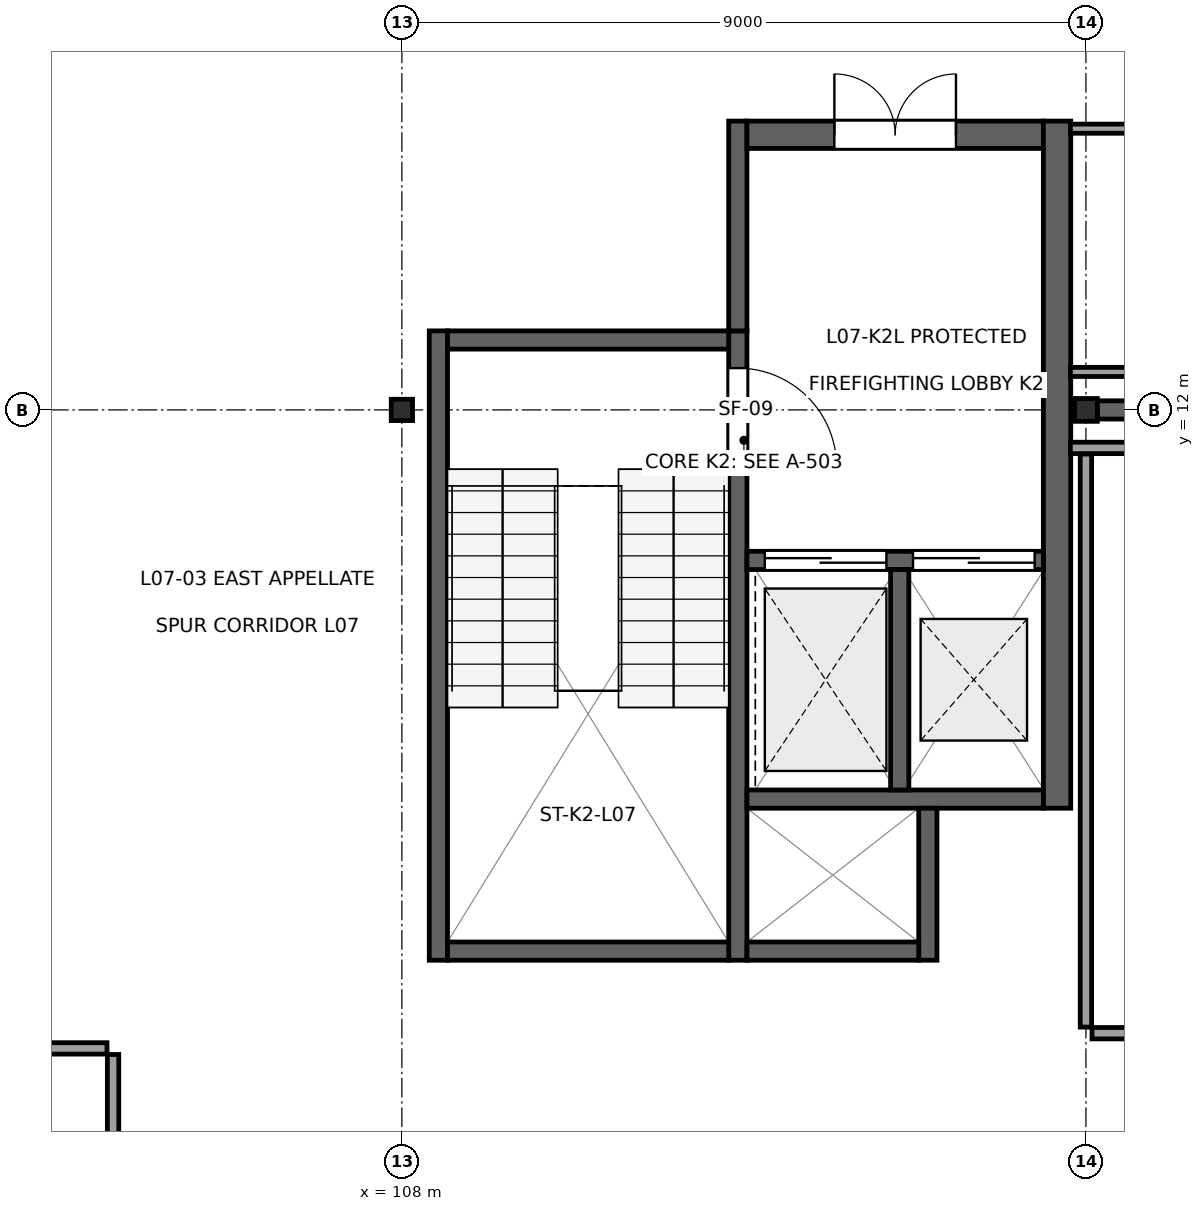
"""IFC4 building model, lengths in metres.
Left out: names, types, materials, properties, quantities, classifications, styles, units other than length and angle.
Written with IfcOpenShell. Run it as: python <this file> out.ifc"""

import sys

from ifc_helpers import new_model, si_unit, direction, frame, frame_2d, origin, origin_2d, place, context, subcontext, project, spatial, rectangle, i_section, extrude, element, fill, save


model = new_model("IFC4")
c1 = context("Model", 3, precision=1e-05, world=origin(), true_north=direction((0.0, 1.0)))
c2 = subcontext(c1, "Body", "Model", "MODEL_VIEW")
j1 = project(units=[si_unit("LENGTHUNIT", "METRE"), si_unit("PLANEANGLEUNIT", "RADIAN")], contexts=[c1])
p1 = place(None, origin())
s1 = spatial("IfcSite", under=j1, at=p1, CompositionType="ELEMENT")
p2 = place(p1, origin())
s2 = spatial("IfcBuilding", under=s1, at=p2, CompositionType="ELEMENT")
p3 = place(p2, frame((0.0, 0.0, 31.4)))
s3 = spatial("IfcBuildingStorey", under=s2, at=p3, CompositionType="ELEMENT", Elevation=31.4)
p4 = place(p3, frame((108.0, 12.0, 0.0), z_axis=(0.0, 0.0, 1.0), x_axis=(1.0, 0.0, 0.0)))
e1 = element("IfcColumn", 1, at=p4, inside=s3, PredefinedType="COLUMN", context=c2, shape_type="SweptSolid", body=[
    extrude(i_section(OverallWidth=0.28, OverallDepth=0.28, WebThickness=0.01, FlangeThickness=0.018, at=origin_2d()), origin(), (0.0, 0.0, 1.0), 4.0),
])
p5 = place(p3, frame((117.0, 12.0, 0.0), z_axis=(0.0, 0.0, 1.0), x_axis=(0.0, 1.0, 0.0)))
e2 = element("IfcColumn", 2, at=p5, inside=s3, PredefinedType="COLUMN", context=c2, shape_type="SweptSolid", body=[
    extrude(i_section(OverallWidth=0.3, OverallDepth=0.3, WebThickness=0.011, FlangeThickness=0.019, at=origin_2d()), origin(), (0.0, 0.0, 1.0), 4.0),
])
p6 = place(p3, frame((108.48, 4.76, 0.0), z_axis=(0.0, 0.0, 1.0), x_axis=(0.0, 1.0, 0.0)))
e3 = element("IfcWall", 3, at=p6, inside=s3, PredefinedType="SHEAR", context=c2, shape_type="SweptSolid", body=[
    extrude(rectangle(XDim=8.28, YDim=0.24, at=frame_2d((4.14, 0.0))), origin(), (0.0, 0.0, 1.0), 3.81),
])
p7 = place(p3, frame((112.42, 4.76, 0.0), z_axis=(0.0, 0.0, 1.0), x_axis=(0.0, 1.0, 0.0)))
e4 = element("IfcWall", 4, at=p7, inside=s3, PredefinedType="SHEAR", context=c2, shape_type="SweptSolid", body=[
    extrude(rectangle(XDim=8.28, YDim=0.24, at=frame_2d((4.14, 0.0))), origin(), (0.0, 0.0, 1.0), 3.81),
])
p8 = place(p7, frame((6.49, 0.0, 0.0)))
e5 = element("IfcOpeningElement", 5, at=p8, cuts=e4, PredefinedType="OPENING", context=c2, shape_type="SweptSolid", body=[
    extrude(rectangle(XDim=1.3, YDim=2.2, at=frame_2d((0.65, 1.1))), frame((0.0, 0.135, 0.0), z_axis=(0.0, -1.0, 0.0), x_axis=(1.0, 0.0, 0.0)), (0.0, 0.0, 1.0), 0.27),
])
for number, where, z_axis, x_axis in (
    (6, (108.6, 4.88, 0.0), (0.0, 0.0, 1.0), (1.0, 0.0, 0.0)),
    (7, (108.6, 12.92, 0.0), (0.0, 0.0, 1.0), (1.0, 0.0, 0.0)),
):
    element("IfcWall", number, at=place(p3, frame(where, z_axis=z_axis, x_axis=x_axis)), inside=s3, PredefinedType="SHEAR", context=c2, shape_type="SweptSolid", body=[
        extrude(rectangle(XDim=3.7, YDim=0.24, at=frame_2d((1.85, 0.0))), origin(), (0.0, 0.0, 1.0), 3.81),
    ])
p9 = place(p3, frame((112.42, 13.04, 0.0), z_axis=(0.0, 0.0, 1.0), x_axis=(0.0, 1.0, 0.0)))
e8 = element("IfcWall", 8, at=p9, inside=s3, PredefinedType="SHEAR", context=c2, shape_type="SweptSolid", body=[
    extrude(rectangle(XDim=2.76, YDim=0.24, at=frame_2d((1.38, 0.0))), origin(), (0.0, 0.0, 1.0), 3.66),
])
p10 = place(p3, frame((112.54, 15.62, 0.0), z_axis=(0.0, 0.0, 1.0), x_axis=(1.0, 0.0, 0.0)))
e9 = element("IfcWall", 9, at=p10, inside=s3, PredefinedType="SHEAR", context=c2, shape_type="SweptSolid", body=[
    extrude(rectangle(XDim=3.9, YDim=0.36, at=frame_2d((1.95, 0.0))), origin(), (0.0, 0.0, 1.0), 3.66),
])
p11 = place(p10, frame((1.15, 0.0, 0.0)))
e10 = element("IfcOpeningElement", 10, at=p11, cuts=e9, PredefinedType="OPENING", context=c2, shape_type="SweptSolid", body=[
    extrude(rectangle(XDim=1.6, YDim=2.25, at=frame_2d((0.8, 1.125))), frame((0.0, 0.195, 0.0), z_axis=(0.0, -1.0, 0.0), x_axis=(1.0, 0.0, 0.0)), (0.0, 0.0, 1.0), 0.39),
])
p12 = place(p3, frame((116.62, 6.76, 0.0), z_axis=(0.0, 0.0, 1.0), x_axis=(0.0, 1.0, 0.0)))
e11 = element("IfcWall", 11, at=p12, inside=s3, PredefinedType="SHEAR", context=c2, shape_type="SweptSolid", body=[
    extrude(rectangle(XDim=9.04, YDim=0.36, at=frame_2d((4.52, 0.0))), origin(), (0.0, 0.0, 1.0), 3.66),
])
p13 = place(p3, frame((112.54, 10.02, 0.0), z_axis=(0.0, 0.0, 1.0), x_axis=(1.0, 0.0, 0.0)))
e12 = element("IfcWall", 12, at=p13, inside=s3, PredefinedType="SHEAR", context=c2, shape_type="SweptSolid", body=[
    extrude(rectangle(XDim=3.9, YDim=0.24, at=frame_2d((1.95, 0.0))), origin(), (0.0, 0.0, 1.0), 3.81),
])
p14 = place(p13, frame((0.235, 0.0, 0.0)))
e13 = element("IfcOpeningElement", 13, at=p14, cuts=e12, PredefinedType="OPENING", context=c2, shape_type="SweptSolid", body=[
    extrude(rectangle(XDim=1.6, YDim=2.3, at=frame_2d((0.8, 1.15))), frame((0.0, 0.135, 0.0), z_axis=(0.0, -1.0, 0.0), x_axis=(1.0, 0.0, 0.0)), (0.0, 0.0, 1.0), 0.27),
])
p15 = place(p13, frame((2.185, 0.0, 0.0)))
e14 = element("IfcOpeningElement", 14, at=p15, cuts=e12, PredefinedType="OPENING", context=c2, shape_type="SweptSolid", body=[
    extrude(rectangle(XDim=1.6, YDim=2.3, at=frame_2d((0.8, 1.15))), frame((0.0, 0.135, 0.0), z_axis=(0.0, -1.0, 0.0), x_axis=(1.0, 0.0, 0.0)), (0.0, 0.0, 1.0), 0.27),
])
p16 = place(p3, frame((112.54, 6.88, 0.0), z_axis=(0.0, 0.0, 1.0), x_axis=(1.0, 0.0, 0.0)))
e15 = element("IfcWall", 15, at=p16, inside=s3, PredefinedType="SHEAR", context=c2, shape_type="SweptSolid", body=[
    extrude(rectangle(XDim=3.9, YDim=0.24, at=frame_2d((1.95, 0.0))), origin(), (0.0, 0.0, 1.0), 3.81),
])
p17 = place(p3, frame((114.55, 7.0, 0.0), z_axis=(0.0, 0.0, 1.0), x_axis=(0.0, 1.0, 0.0)))
e16 = element("IfcWall", 16, at=p17, inside=s3, PredefinedType="SHEAR", context=c2, shape_type="SweptSolid", body=[
    extrude(rectangle(XDim=2.9, YDim=0.24, at=frame_2d((1.45, 0.0))), origin(), (0.0, 0.0, 1.0), 3.81),
])
p18 = place(p3, frame((114.92, 4.76, 0.0), z_axis=(0.0, 0.0, 1.0), x_axis=(0.0, 1.0, 0.0)))
e17 = element("IfcWall", 17, at=p18, inside=s3, PredefinedType="SHEAR", context=c2, shape_type="SweptSolid", body=[
    extrude(rectangle(XDim=2.0, YDim=0.24, at=frame_2d((1.0, 0.0))), origin(), (0.0, 0.0, 1.0), 3.81),
])
p19 = place(p3, frame((112.54, 4.88, 0.0), z_axis=(0.0, 0.0, 1.0), x_axis=(1.0, 0.0, 0.0)))
e18 = element("IfcWall", 18, at=p19, inside=s3, PredefinedType="SHEAR", context=c2, shape_type="SweptSolid", body=[
    extrude(rectangle(XDim=2.26, YDim=0.24, at=frame_2d((1.13, 0.0))), origin(), (0.0, 0.0, 1.0), 3.81),
])
p20 = place(p3, frame((117.148, 12.0, 0.0), z_axis=(0.0, 0.0, 1.0), x_axis=(1.0, 0.0, 0.0)))
e19 = element("IfcWall", 19, at=p20, inside=s3, PredefinedType="SHEAR", context=c2, shape_type="SweptSolid", body=[
    extrude(rectangle(XDim=8.844, YDim=0.24, at=frame_2d((4.422, 0.0))), origin(), (0.0, 0.0, 1.0), 3.305),
])
p21 = place(p3, frame((45.88, 3.6, 0.0), z_axis=(0.0, 0.0, 1.0), x_axis=(1.0, 0.0, 0.0)))
e20 = element("IfcWall", 20, at=p21, inside=s3, PredefinedType="PARTITIONING", context=c2, shape_type="SweptSolid", body=[
    extrude(rectangle(XDim=58.24, YDim=0.15, at=frame_2d((29.12, 0.0))), origin(), (0.0, 0.0, 1.0), 3.64),
])
p22 = place(p21, frame((27.795, 0.0, 0.0)))
e21 = element("IfcOpeningElement", 21, at=p22, cuts=e20, PredefinedType="OPENING", context=c2, shape_type="SweptSolid", body=[
    extrude(rectangle(XDim=1.05, YDim=2.25, at=frame_2d((0.525, 1.125))), frame((0.0, 0.09, 0.0), z_axis=(0.0, -1.0, 0.0), x_axis=(1.0, 0.0, 0.0)), (0.0, 0.0, 1.0), 0.18),
])
p23 = place(p3, frame((104.2, 3.52, 0.0), z_axis=(0.0, 0.0, 1.0), x_axis=(0.0, -1.0, 0.0)))
e22 = element("IfcWall", 22, at=p23, inside=s3, PredefinedType="PARTITIONING", context=c2, shape_type="SweptSolid", body=[
    extrude(rectangle(XDim=3.385, YDim=0.15, at=frame_2d((1.692, 0.0))), origin(), (0.0, 0.0, 1.0), 3.64),
])
p24 = place(p3, frame((117.0, 3.88, 0.0), z_axis=(0.0, 0.0, 1.0), x_axis=(0.0, 1.0, 0.0)))
e23 = element("IfcWall", 23, at=p24, inside=s3, PredefinedType="PARTITIONING", context=c2, shape_type="SweptSolid", body=[
    extrude(rectangle(XDim=7.54, YDim=0.15, at=frame_2d((3.77, 0.0))), origin(), (0.0, 0.0, 1.0), 3.305),
])
p25 = place(p3, frame((116.795, 11.5, 0.0), z_axis=(0.0, 0.0, 1.0), x_axis=(1.0, 0.0, 0.0)))
e24 = element("IfcWall", 24, at=p25, inside=s3, PredefinedType="PARTITIONING", context=c2, shape_type="SweptSolid", body=[
    extrude(rectangle(XDim=9.07, YDim=0.15, at=frame_2d((4.535, 0.0))), origin(), (0.0, 0.0, 1.0), 3.64),
])
p26 = place(p3, frame((125.865, 3.8, 0.0), z_axis=(0.0, 0.0, 1.0), x_axis=(-1.0, 0.0, 0.0)))
e25 = element("IfcWall", 25, at=p26, inside=s3, PredefinedType="PARTITIONING", context=c2, shape_type="SweptSolid", body=[
    extrude(rectangle(XDim=8.785, YDim=0.15, at=frame_2d((4.393, 0.0))), origin(), (0.0, 0.0, 1.0), 3.64),
])
p27 = place(p26, frame((3.867, 0.0, 0.0)))
e26 = element("IfcOpeningElement", 26, at=p27, cuts=e25, PredefinedType="OPENING", context=c2, shape_type="SweptSolid", body=[
    extrude(rectangle(XDim=1.05, YDim=2.25, at=frame_2d((0.525, 1.125))), frame((0.0, 0.09, 0.0), z_axis=(0.0, -1.0, 0.0), x_axis=(1.0, 0.0, 0.0)), (0.0, 0.0, 1.0), 0.18),
])
p28 = place(p3, frame((125.865, 12.5, 0.0), z_axis=(0.0, 0.0, 1.0), x_axis=(-1.0, 0.0, 0.0)))
e27 = element("IfcWall", 27, at=p28, inside=s3, PredefinedType="PARTITIONING", context=c2, shape_type="SweptSolid", body=[
    extrude(rectangle(XDim=9.07, YDim=0.12, at=frame_2d((4.535, 0.0))), origin(), (0.0, 0.0, 1.0), 3.64),
])
p29 = place(p3, frame((116.795, 15.7, 0.0), z_axis=(0.0, 0.0, 1.0), x_axis=(1.0, 0.0, 0.0)))
e28 = element("IfcWall", 28, at=p29, inside=s3, PredefinedType="PARTITIONING", context=c2, shape_type="SweptSolid", body=[
    extrude(rectangle(XDim=9.07, YDim=0.12, at=frame_2d((4.535, 0.0))), origin(), (0.0, 0.0, 1.0), 3.64),
])
p30 = place(p29, frame((4.06, 0.0, 0.0)))
e29 = element("IfcOpeningElement", 29, at=p30, cuts=e28, PredefinedType="OPENING", context=c2, shape_type="SweptSolid", body=[
    extrude(rectangle(XDim=0.95, YDim=2.15, at=frame_2d((0.475, 1.075))), frame((0.0, 0.075, 0.0), z_axis=(0.0, -1.0, 0.0), x_axis=(1.0, 0.0, 0.0)), (0.0, 0.0, 1.0), 0.15),
])
p31 = place(p8, frame((1.3, 0.0, 0.0), z_axis=(0.0, 0.0, 1.0), x_axis=(-1.0, 0.0, 0.0)))
e30 = element("IfcDoor", 30, at=p31, inside=s3, OperationType="SINGLE_SWING_LEFT", PredefinedType="DOOR", context=c2, shape_type="SweptSolid", body=[
    extrude(rectangle(XDim=1.3, YDim=2.2, at=frame_2d((0.65, 1.1))), frame((0.0, 0.025, 0.0), z_axis=(0.0, -1.0, 0.0), x_axis=(1.0, 0.0, 0.0)), (0.0, 0.0, 1.0), 0.05),
])
fill(e5, e30)
p32 = place(p11, origin())
e31 = element("IfcDoor", 31, at=p32, inside=s3, OperationType="DOUBLE_DOOR_SINGLE_SWING", PredefinedType="DOOR", context=c2, shape_type="SweptSolid", body=[
    extrude(rectangle(XDim=1.6, YDim=2.25, at=frame_2d((0.8, 1.125))), frame((0.0, 0.025, 0.0), z_axis=(0.0, -1.0, 0.0), x_axis=(1.0, 0.0, 0.0)), (0.0, 0.0, 1.0), 0.05),
])
fill(e10, e31)
p33 = place(p14, origin())
e32 = element("IfcDoor", 32, at=p33, inside=s3, OperationType="DOUBLE_DOOR_SLIDING", PredefinedType="DOOR", context=c2, shape_type="SweptSolid", body=[
    extrude(rectangle(XDim=1.6, YDim=2.3, at=frame_2d((0.8, 1.15))), frame((0.0, 0.025, 0.0), z_axis=(0.0, -1.0, 0.0), x_axis=(1.0, 0.0, 0.0)), (0.0, 0.0, 1.0), 0.05),
])
fill(e13, e32)
p34 = place(p15, origin())
e33 = element("IfcDoor", 33, at=p34, inside=s3, OperationType="DOUBLE_DOOR_SLIDING", PredefinedType="DOOR", context=c2, shape_type="SweptSolid", body=[
    extrude(rectangle(XDim=1.6, YDim=2.3, at=frame_2d((0.8, 1.15))), frame((0.0, 0.025, 0.0), z_axis=(0.0, -1.0, 0.0), x_axis=(1.0, 0.0, 0.0)), (0.0, 0.0, 1.0), 0.05),
])
fill(e14, e33)
save(model, sys.argv[1])
